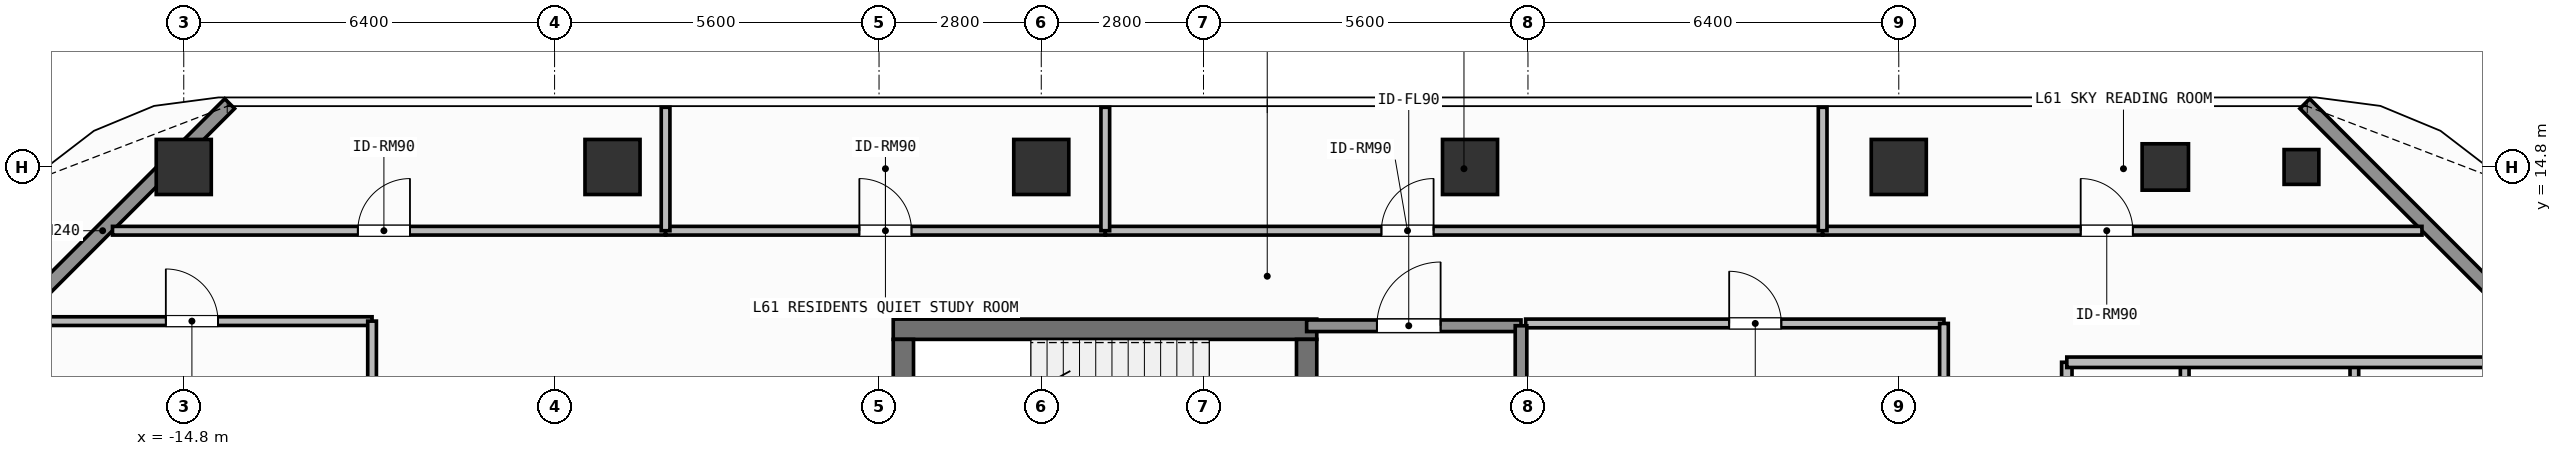
"""IFC4 building model, lengths in metres.
Left out: names, types, materials, properties, quantities, classifications, styles, units other than length and angle.
Written with IfcOpenShell. Run it as: python <this file> out.ifc"""

import sys

from ifc_helpers import new_model, si_unit, direction, frame, frame_2d, origin, origin_2d, place, context, subcontext, project, spatial, rectangle, hollow_rectangle, extrude, element, fill, save


model = new_model("IFC4")
c1 = context("Model", 3, precision=1e-05, world=origin(), true_north=direction((0.0, 1.0)))
c2 = subcontext(c1, "Body", "Model", "MODEL_VIEW")
j1 = project(units=[si_unit("LENGTHUNIT", "METRE"), si_unit("PLANEANGLEUNIT", "RADIAN")], contexts=[c1])
p1 = place(None, origin())
s1 = spatial("IfcSite", under=j1, at=p1, CompositionType="ELEMENT")
p2 = place(p1, origin())
s2 = spatial("IfcBuilding", under=s1, at=p2, CompositionType="ELEMENT")
p3 = place(p2, frame((0.0, 0.0, 250.8)))
s3 = spatial("IfcBuildingStorey", under=s2, at=p3, CompositionType="ELEMENT", Elevation=250.8)
p4 = place(p3, frame((-2.555, 12.0, 0.0), z_axis=(0.0, 0.0, 1.0), x_axis=(1.0, 0.0, 0.0)))
e1 = element("IfcWall", 1, at=p4, inside=s3, PredefinedType="SHEAR", context=c2, shape_type="SweptSolid", body=[
    extrude(rectangle(XDim=7.31, YDim=0.35, at=frame_2d((3.655, 0.0))), origin(), (0.0, 0.0, 1.0), 3.9),
])
p5 = place(p3, frame((-2.38, 8.9, 0.0), z_axis=(0.0, 0.0, 1.0), x_axis=(0.0, 1.0, 0.0)))
e2 = element("IfcWall", 2, at=p5, inside=s3, PredefinedType="SHEAR", context=c2, shape_type="SweptSolid", body=[
    extrude(rectangle(XDim=2.925, YDim=0.35, at=frame_2d((1.462, 0.0))), origin(), (0.0, 0.0, 1.0), 3.9),
])
p6 = place(p3, frame((4.58, 11.825, 0.0), z_axis=(0.0, 0.0, 1.0), x_axis=(0.0, -1.0, 0.0)))
e3 = element("IfcWall", 3, at=p6, inside=s3, PredefinedType="SHEAR", context=c2, shape_type="SweptSolid", body=[
    extrude(rectangle(XDim=2.925, YDim=0.35, at=frame_2d((1.462, 0.0))), origin(), (0.0, 0.0, 1.0), 3.9),
])
p7 = place(p6, frame((0.913, 0.0, 0.0)))
e4 = element("IfcOpeningElement", 4, at=p7, cuts=e3, PredefinedType="OPENING", context=c2, shape_type="SweptSolid", body=[
    extrude(rectangle(XDim=1.1, YDim=2.15, at=frame_2d((0.55, 1.075))), frame((0.0, 0.185, 0.0), z_axis=(0.0, -1.0, 0.0), x_axis=(1.0, 0.0, 0.0)), (0.0, 0.0, 1.0), 0.37),
])
for number, where, z_axis, x_axis in (
    (5, (-14.8, 14.8, 0.0), (0.0, 0.0, 1.0), (1.0, 0.0, 0.0)),
    (6, (-7.4, 14.8, 0.0), (0.0, 0.0, 1.0), (1.0, 0.0, 0.0)),
    (7, (0.0, 14.8, 0.0), (0.0, 0.0, 1.0), (1.0, 0.0, 0.0)),
    (8, (7.4, 14.8, 0.0), (0.0, 0.0, 1.0), (1.0, 0.0, 0.0)),
    (9, (14.8, 14.8, 0.0), (0.0, 0.0, 1.0), (1.0, 0.0, 0.0)),
):
    element("IfcColumn", number, at=place(p3, frame(where, z_axis=z_axis, x_axis=x_axis)), inside=s3, PredefinedType="COLUMN", context=c2, shape_type="SweptSolid", body=[
        extrude(rectangle(XDim=0.95, YDim=0.95, at=origin_2d()), origin(), (0.0, 0.0, 1.0), 3.9),
    ])
p8 = place(p3, frame((19.4, 14.8, 0.0), z_axis=(0.0, 0.0, 1.0), x_axis=(1.0, 0.0, 0.0)))
e10 = element("IfcColumn", 10, at=p8, inside=s3, PredefinedType="COLUMN", context=c2, shape_type="SweptSolid", body=[
    extrude(hollow_rectangle(XDim=0.8, YDim=0.8, WallThickness=0.036, at=origin_2d()), origin(), (0.0, 0.0, 1.0), 3.9),
])
p9 = place(p3, frame((21.75, 14.8, 0.0), z_axis=(0.0, 0.0, 1.0), x_axis=(1.0, 0.0, 0.0)))
e11 = element("IfcColumn", 11, at=p9, inside=s3, PredefinedType="COLUMN", context=c2, shape_type="SweptSolid", body=[
    extrude(hollow_rectangle(XDim=0.6, YDim=0.6, WallThickness=0.028, at=origin_2d()), origin(), (0.0, 0.0, 1.0), 3.9),
])
for number, where, z_axis, x_axis in (
    (12, (-18.392, 11.508, 0.0), (0.0, 0.0, 1.0), (0.707, 0.707, 0.0)),
    (13, (21.808, 15.892, 0.0), (0.0, 0.0, 1.0), (0.707, -0.707, 0.0)),
):
    element("IfcWall", number, at=place(p3, frame(where, z_axis=z_axis, x_axis=x_axis)), inside=s3, PredefinedType="SOLIDWALL", context=c2, shape_type="SweptSolid", body=[
        extrude(rectangle(XDim=6.201, YDim=0.24, at=frame_2d((3.101, 0.0))), origin(), (0.0, 0.0, 1.0), 3.62),
    ])
p10 = place(p3, frame((4.58, 12.06, 0.0), z_axis=(0.0, 0.0, 1.0), x_axis=(1.0, 0.0, 0.0)))
e14 = element("IfcWall", 14, at=p10, inside=s3, PredefinedType="SOLIDWALL", context=c2, shape_type="SweptSolid", body=[
    extrude(rectangle(XDim=3.7, YDim=0.2, at=frame_2d((1.85, 0.0))), origin(), (0.0, 0.0, 1.0), 3.62),
])
p11 = place(p10, frame((1.212, 0.0, 0.0)))
e15 = element("IfcOpeningElement", 15, at=p11, cuts=e14, PredefinedType="OPENING", context=c2, shape_type="SweptSolid", body=[
    extrude(rectangle(XDim=1.1, YDim=2.15, at=frame_2d((0.55, 1.075))), frame((0.0, 0.11, 0.0), z_axis=(0.0, -1.0, 0.0), x_axis=(1.0, 0.0, 0.0)), (0.0, 0.0, 1.0), 0.22),
])
p12 = place(p3, frame((8.36, 12.1, 0.0), z_axis=(0.0, 0.0, 1.0), x_axis=(1.0, 0.0, 0.0)))
e16 = element("IfcWall", 16, at=p12, inside=s3, PredefinedType="PARTITIONING", context=c2, shape_type="SweptSolid", body=[
    extrude(rectangle(XDim=7.22, YDim=0.15, at=frame_2d((3.61, 0.0))), origin(), (0.0, 0.0, 1.0), 3.62),
])
p13 = place(p12, frame((3.513, 0.0, 0.0)))
e17 = element("IfcOpeningElement", 17, at=p13, cuts=e16, PredefinedType="OPENING", context=c2, shape_type="SweptSolid", body=[
    extrude(rectangle(XDim=0.9, YDim=2.1, at=frame_2d((0.45, 1.05))), frame((0.0, 0.085, 0.0), z_axis=(0.0, -1.0, 0.0), x_axis=(1.0, 0.0, 0.0)), (0.0, 0.0, 1.0), 0.17),
])
p14 = place(p3, frame((-16.03, 13.7, 0.0), z_axis=(0.0, 0.0, 1.0), x_axis=(1.0, 0.0, 0.0)))
e18 = element("IfcWall", 18, at=p14, inside=s3, PredefinedType="PARTITIONING", context=c2, shape_type="SweptSolid", body=[
    extrude(rectangle(XDim=9.546, YDim=0.15, at=frame_2d((4.773, 0.0))), origin(), (0.0, 0.0, 1.0), 3.62),
])
p15 = place(p14, frame((4.234, 0.0, 0.0)))
e19 = element("IfcOpeningElement", 19, at=p15, cuts=e18, PredefinedType="OPENING", context=c2, shape_type="SweptSolid", body=[
    extrude(rectangle(XDim=0.9, YDim=2.1, at=frame_2d((0.45, 1.05))), frame((0.0, 0.085, 0.0), z_axis=(0.0, -1.0, 0.0), x_axis=(1.0, 0.0, 0.0)), (0.0, 0.0, 1.0), 0.17),
])
p16 = place(p3, frame((-6.484, 13.7, 0.0), z_axis=(0.0, 0.0, 1.0), x_axis=(1.0, 0.0, 0.0)))
e20 = element("IfcWall", 20, at=p16, inside=s3, PredefinedType="PARTITIONING", context=c2, shape_type="SweptSolid", body=[
    extrude(rectangle(XDim=7.589, YDim=0.15, at=frame_2d((3.794, 0.0))), origin(), (0.0, 0.0, 1.0), 3.62),
])
p17 = place(p16, frame((3.344, 0.0, 0.0)))
e21 = element("IfcOpeningElement", 21, at=p17, cuts=e20, PredefinedType="OPENING", context=c2, shape_type="SweptSolid", body=[
    extrude(rectangle(XDim=0.9, YDim=2.1, at=frame_2d((0.45, 1.05))), frame((0.0, 0.085, 0.0), z_axis=(0.0, -1.0, 0.0), x_axis=(1.0, 0.0, 0.0)), (0.0, 0.0, 1.0), 0.17),
])
p18 = place(p3, frame((1.105, 13.7, 0.0), z_axis=(0.0, 0.0, 1.0), x_axis=(1.0, 0.0, 0.0)))
e22 = element("IfcWall", 22, at=p18, inside=s3, PredefinedType="PARTITIONING", context=c2, shape_type="SweptSolid", body=[
    extrude(rectangle(XDim=12.381, YDim=0.15, at=frame_2d((6.19, 0.0))), origin(), (0.0, 0.0, 1.0), 3.62),
])
p19 = place(p18, frame((4.766, 0.0, 0.0)))
e23 = element("IfcOpeningElement", 23, at=p19, cuts=e22, PredefinedType="OPENING", context=c2, shape_type="SweptSolid", body=[
    extrude(rectangle(XDim=0.9, YDim=2.1, at=frame_2d((0.45, 1.05))), frame((0.0, 0.085, 0.0), z_axis=(0.0, -1.0, 0.0), x_axis=(1.0, 0.0, 0.0)), (0.0, 0.0, 1.0), 0.17),
])
p20 = place(p3, frame((13.486, 13.7, 0.0), z_axis=(0.0, 0.0, 1.0), x_axis=(1.0, 0.0, 0.0)))
e24 = element("IfcWall", 24, at=p20, inside=s3, PredefinedType="PARTITIONING", context=c2, shape_type="SweptSolid", body=[
    extrude(rectangle(XDim=10.344, YDim=0.15, at=frame_2d((5.172, 0.0))), origin(), (0.0, 0.0, 1.0), 3.62),
])
p21 = place(p20, frame((4.454, 0.0, 0.0)))
e25 = element("IfcOpeningElement", 25, at=p21, cuts=e24, PredefinedType="OPENING", context=c2, shape_type="SweptSolid", body=[
    extrude(rectangle(XDim=0.9, YDim=2.1, at=frame_2d((0.45, 1.05))), frame((0.0, 0.085, 0.0), z_axis=(0.0, -1.0, 0.0), x_axis=(1.0, 0.0, 0.0)), (0.0, 0.0, 1.0), 0.17),
])
p22 = place(p3, frame((-17.59, 12.14, 0.0), z_axis=(0.0, 0.0, 1.0), x_axis=(1.0, 0.0, 0.0)))
e26 = element("IfcWall", 26, at=p22, inside=s3, PredefinedType="PARTITIONING", context=c2, shape_type="SweptSolid", body=[
    extrude(rectangle(XDim=6.04, YDim=0.15, at=frame_2d((3.02, 0.0))), origin(), (0.0, 0.0, 1.0), 3.62),
])
p23 = place(p22, frame((2.481, 0.0, 0.0)))
e27 = element("IfcOpeningElement", 27, at=p23, cuts=e26, PredefinedType="OPENING", context=c2, shape_type="SweptSolid", body=[
    extrude(rectangle(XDim=0.9, YDim=2.1, at=frame_2d((0.45, 1.05))), frame((0.0, 0.085, 0.0), z_axis=(0.0, -1.0, 0.0), x_axis=(1.0, 0.0, 0.0)), (0.0, 0.0, 1.0), 0.17),
])
p24 = place(p3, frame((17.7, -12.12, 0.0), z_axis=(0.0, 0.0, 1.0), x_axis=(0.0, 1.0, 0.0)))
e28 = element("IfcWall", 28, at=p24, inside=s3, PredefinedType="PARTITIONING", context=c2, shape_type="SweptSolid", body=[
    extrude(rectangle(XDim=23.55, YDim=0.18, at=frame_2d((11.775, 0.0))), origin(), (0.0, 0.0, 1.0), 3.62),
])
p25 = place(p24, frame((11.454, 0.0, 0.0)))
e29 = element("IfcOpeningElement", 29, at=p25, cuts=e28, PredefinedType="OPENING", context=c2, shape_type="SweptSolid", body=[
    extrude(rectangle(XDim=1.0, YDim=2.2, at=frame_2d((0.5, 1.1))), frame((0.0, 0.1, 0.0), z_axis=(0.0, -1.0, 0.0), x_axis=(1.0, 0.0, 0.0)), (0.0, 0.0, 1.0), 0.2),
])
p26 = place(p3, frame((8.28, 8.725, 0.0), z_axis=(0.0, 0.0, 1.0), x_axis=(0.0, 1.0, 0.0)))
e30 = element("IfcWall", 30, at=p26, inside=s3, PredefinedType="SOLIDWALL", context=c2, shape_type="SweptSolid", body=[
    extrude(rectangle(XDim=3.335, YDim=0.2, at=frame_2d((1.667, 0.0))), origin(), (0.0, 0.0, 1.0), 3.62),
])
p27 = place(p3, frame((15.58, 5.85, 0.0), z_axis=(0.0, 0.0, 1.0), x_axis=(0.0, 1.0, 0.0)))
e31 = element("IfcWall", 31, at=p27, inside=s3, PredefinedType="PARTITIONING", context=c2, shape_type="SweptSolid", body=[
    extrude(rectangle(XDim=6.25, YDim=0.15, at=frame_2d((3.125, 0.0))), origin(), (0.0, 0.0, 1.0), 3.62),
])
for number, where, z_axis, x_axis in (
    (32, (-6.484, 13.7, 0.0), (0.0, 0.0, 1.0), (0.0, 1.0, 0.0)),
    (33, (1.105, 13.7, 0.0), (0.0, 0.0, 1.0), (0.0, 1.0, 0.0)),
    (34, (13.486, 13.7, 0.0), (0.0, 0.0, 1.0), (0.0, 1.0, 0.0)),
):
    element("IfcWall", number, at=place(p3, frame(where, z_axis=z_axis, x_axis=x_axis)), inside=s3, PredefinedType="PARTITIONING", context=c2, shape_type="SweptSolid", body=[
        extrude(rectangle(XDim=2.13, YDim=0.15, at=frame_2d((1.065, 0.0))), origin(), (0.0, 0.0, 1.0), 3.62),
    ])
p28 = place(p3, frame((-11.55, 4.1, 0.0), z_axis=(0.0, 0.0, 1.0), x_axis=(0.0, 1.0, 0.0)))
e35 = element("IfcWall", 35, at=p28, inside=s3, PredefinedType="PARTITIONING", context=c2, shape_type="SweptSolid", body=[
    extrude(rectangle(XDim=8.04, YDim=0.15, at=frame_2d((4.02, 0.0))), origin(), (0.0, 0.0, 1.0), 3.62),
])
p29 = place(p3, frame((19.735, 5.282, 0.0), z_axis=(0.0, 0.0, 1.0), x_axis=(0.0, 1.0, 0.0)))
e36 = element("IfcWall", 36, at=p29, inside=s3, PredefinedType="PARTITIONING", context=c2, shape_type="SweptSolid", body=[
    extrude(rectangle(XDim=6.148, YDim=0.15, at=frame_2d((3.074, 0.0))), origin(), (0.0, 0.0, 1.0), 2.71),
])
p30 = place(p3, frame((22.663, 5.282, 0.0), z_axis=(0.0, 0.0, 1.0), x_axis=(0.0, 1.0, 0.0)))
e37 = element("IfcWall", 37, at=p30, inside=s3, PredefinedType="PARTITIONING", context=c2, shape_type="SweptSolid", body=[
    extrude(rectangle(XDim=6.148, YDim=0.15, at=frame_2d((3.074, 0.0))), origin(), (0.0, 0.0, 1.0), 3.62),
])
p31 = place(p3, frame((17.7, 11.43, 0.0), z_axis=(0.0, 0.0, 1.0), x_axis=(1.0, 0.0, 0.0)))
e38 = element("IfcWall", 38, at=p31, inside=s3, PredefinedType="PARTITIONING", context=c2, shape_type="SweptSolid", body=[
    extrude(rectangle(XDim=8.43, YDim=0.18, at=frame_2d((4.215, 0.0))), origin(), (0.0, 0.0, 1.0), 3.62),
])
p32 = place(p11, origin())
e39 = element("IfcDoor", 39, at=p32, inside=s3, OperationType="SINGLE_SWING_RIGHT", PredefinedType="DOOR", context=c2, shape_type="SweptSolid", body=[
    extrude(rectangle(XDim=1.1, YDim=2.15, at=frame_2d((0.55, 1.075))), frame((0.0, 0.025, 0.0), z_axis=(0.0, -1.0, 0.0), x_axis=(1.0, 0.0, 0.0)), (0.0, 0.0, 1.0), 0.05),
])
fill(e15, e39)
p33 = place(p13, origin())
e40 = element("IfcDoor", 40, at=p33, inside=s3, OperationType="SINGLE_SWING_LEFT", PredefinedType="DOOR", context=c2, shape_type="SweptSolid", body=[
    extrude(rectangle(XDim=0.9, YDim=2.1, at=frame_2d((0.45, 1.05))), frame((0.0, 0.025, 0.0), z_axis=(0.0, -1.0, 0.0), x_axis=(1.0, 0.0, 0.0)), (0.0, 0.0, 1.0), 0.05),
])
fill(e17, e40)
p34 = place(p15, origin())
e41 = element("IfcDoor", 41, at=p34, inside=s3, OperationType="SINGLE_SWING_RIGHT", PredefinedType="DOOR", context=c2, shape_type="SweptSolid", body=[
    extrude(rectangle(XDim=0.9, YDim=2.1, at=frame_2d((0.45, 1.05))), frame((0.0, 0.025, 0.0), z_axis=(0.0, -1.0, 0.0), x_axis=(1.0, 0.0, 0.0)), (0.0, 0.0, 1.0), 0.05),
])
fill(e19, e41)
p35 = place(p17, origin())
e42 = element("IfcDoor", 42, at=p35, inside=s3, OperationType="SINGLE_SWING_LEFT", PredefinedType="DOOR", context=c2, shape_type="SweptSolid", body=[
    extrude(rectangle(XDim=0.9, YDim=2.1, at=frame_2d((0.45, 1.05))), frame((0.0, 0.025, 0.0), z_axis=(0.0, -1.0, 0.0), x_axis=(1.0, 0.0, 0.0)), (0.0, 0.0, 1.0), 0.05),
])
fill(e21, e42)
p36 = place(p19, origin())
e43 = element("IfcDoor", 43, at=p36, inside=s3, OperationType="SINGLE_SWING_RIGHT", PredefinedType="DOOR", context=c2, shape_type="SweptSolid", body=[
    extrude(rectangle(XDim=0.9, YDim=2.1, at=frame_2d((0.45, 1.05))), frame((0.0, 0.025, 0.0), z_axis=(0.0, -1.0, 0.0), x_axis=(1.0, 0.0, 0.0)), (0.0, 0.0, 1.0), 0.05),
])
fill(e23, e43)
p37 = place(p21, origin())
e44 = element("IfcDoor", 44, at=p37, inside=s3, OperationType="SINGLE_SWING_LEFT", PredefinedType="DOOR", context=c2, shape_type="SweptSolid", body=[
    extrude(rectangle(XDim=0.9, YDim=2.1, at=frame_2d((0.45, 1.05))), frame((0.0, 0.025, 0.0), z_axis=(0.0, -1.0, 0.0), x_axis=(1.0, 0.0, 0.0)), (0.0, 0.0, 1.0), 0.05),
])
fill(e25, e44)
p38 = place(p23, origin())
e45 = element("IfcDoor", 45, at=p38, inside=s3, OperationType="SINGLE_SWING_LEFT", PredefinedType="DOOR", context=c2, shape_type="SweptSolid", body=[
    extrude(rectangle(XDim=0.9, YDim=2.1, at=frame_2d((0.45, 1.05))), frame((0.0, 0.025, 0.0), z_axis=(0.0, -1.0, 0.0), x_axis=(1.0, 0.0, 0.0)), (0.0, 0.0, 1.0), 0.05),
])
fill(e27, e45)
save(model, sys.argv[1])
